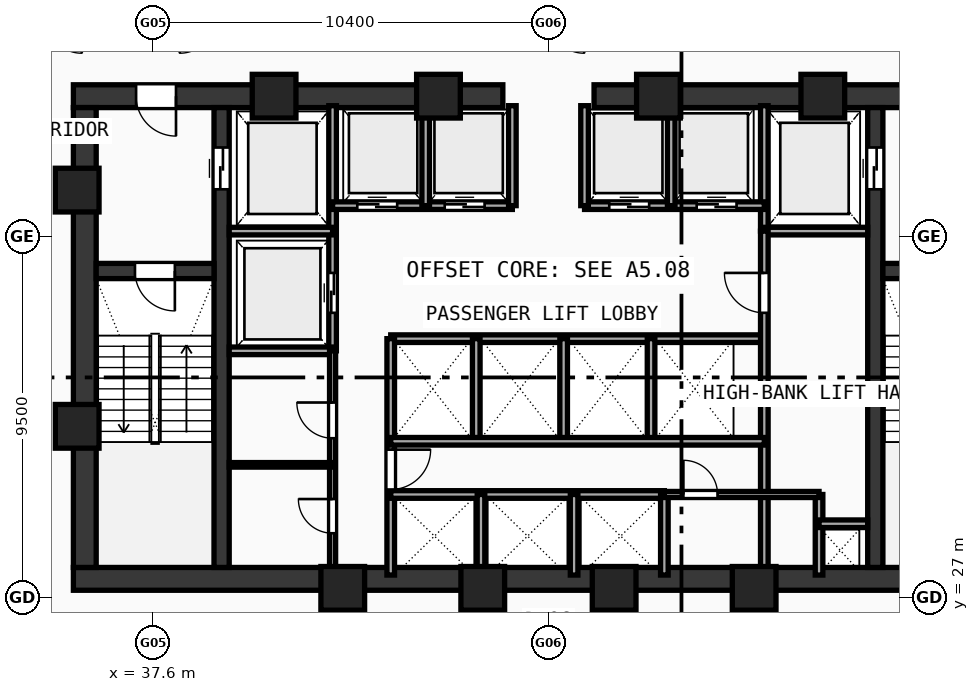
"""IFC4 building model, lengths in metres.
Left out: names, types, materials, properties, quantities, classifications, styles, units other than length and angle.
Written with IfcOpenShell. Run it as: python <this file> out.ifc"""

import sys

from ifc_helpers import new_model, si_unit, direction, frame, frame_2d, origin, origin_with_axes, origin_2d, place, context, subcontext, project, spatial, rectangle, hollow_rectangle, extrude, source, transform, mapped, element, fill, save


model = new_model("IFC4")
c1 = context("Model", 3, precision=1e-05, world=origin(), true_north=direction((0.0, 1.0)))
c2 = subcontext(c1, "Body", "Model", "MODEL_VIEW")
j1 = project(units=[si_unit("LENGTHUNIT", "METRE"), si_unit("PLANEANGLEUNIT", "RADIAN")], contexts=[c1])
p1 = place(None, origin())
s1 = spatial("IfcSite", under=j1, at=p1, CompositionType="ELEMENT")
p2 = place(p1, origin())
s2 = spatial("IfcBuilding", under=s1, at=p2, CompositionType="ELEMENT")
p3 = place(p2, frame((0.0, 0.0, 100.18)))
s3 = spatial("IfcBuildingStorey", under=s2, at=p3, CompositionType="ELEMENT", Elevation=100.18)
p4 = place(p3, frame((35.5, 27.5, 0.0), z_axis=(0.0, 0.0, 1.0), x_axis=(1.0, 0.0, 0.0)))
e1 = element("IfcWall", 1, at=p4, inside=s3, PredefinedType="SHEAR", context=c2, shape_type="SweptSolid", body=[
    extrude(rectangle(XDim=25.0, YDim=0.6, at=frame_2d((12.5, 0.0))), origin(), (0.0, 0.0, 1.0), 3.54),
])
p5 = place(p3, frame((35.5, 40.2, 0.0), z_axis=(0.0, 0.0, 1.0), x_axis=(1.0, 0.0, 0.0)))
e2 = element("IfcWall", 2, at=p5, inside=s3, PredefinedType="SHEAR", context=c2, shape_type="SweptSolid", body=[
    extrude(rectangle(XDim=11.3, YDim=0.6, at=frame_2d((5.65, 0.0))), origin(), (0.0, 0.0, 1.0), 3.54),
])
p6 = place(p5, frame((1.65, 0.0, 0.0)))
e3 = element("IfcOpeningElement", 3, at=p6, cuts=e2, PredefinedType="OPENING", context=c2, shape_type="SweptSolid", body=[
    extrude(rectangle(XDim=1.05, YDim=2.1, at=frame_2d((0.525, 1.05))), frame((0.0, 0.31, 0.0), z_axis=(0.0, -1.0, 0.0), x_axis=(1.0, 0.0, 0.0)), (0.0, 0.0, 1.0), 0.62),
])
p7 = place(p3, frame((49.2, 40.2, 0.0), z_axis=(0.0, 0.0, 1.0), x_axis=(1.0, 0.0, 0.0)))
e4 = element("IfcWall", 4, at=p7, inside=s3, PredefinedType="SHEAR", context=c2, shape_type="SweptSolid", body=[
    extrude(rectangle(XDim=11.3, YDim=0.6, at=frame_2d((5.65, 0.0))), origin(), (0.0, 0.0, 1.0), 3.54),
])
p8 = place(p7, frame((8.6, 0.0, 0.0)))
e5 = element("IfcOpeningElement", 5, at=p8, cuts=e4, PredefinedType="OPENING", context=c2, shape_type="SweptSolid", body=[
    extrude(rectangle(XDim=1.05, YDim=2.1, at=frame_2d((0.525, 1.05))), frame((0.0, 0.31, 0.0), z_axis=(0.0, -1.0, 0.0), x_axis=(1.0, 0.0, 0.0)), (0.0, 0.0, 1.0), 0.62),
])
p9 = place(p3, frame((35.8, 27.8, 0.0), z_axis=(0.0, 0.0, 1.0), x_axis=(0.0, 1.0, 0.0)))
e6 = element("IfcWall", 6, at=p9, inside=s3, PredefinedType="SHEAR", context=c2, shape_type="SweptSolid", body=[
    extrude(rectangle(XDim=12.1, YDim=0.6, at=frame_2d((6.05, 0.0))), origin(), (0.0, 0.0, 1.0), 3.54),
])
p10 = place(p3, frame((39.4, 27.8, 0.0), z_axis=(0.0, 0.0, 1.0), x_axis=(0.0, 1.0, 0.0)))
e7 = element("IfcWall", 7, at=p10, inside=s3, PredefinedType="SHEAR", context=c2, shape_type="SweptSolid", body=[
    extrude(rectangle(XDim=12.1, YDim=0.4, at=frame_2d((6.05, 0.0))), origin(), (0.0, 0.0, 1.0), 3.54),
])
p11 = place(p10, frame((9.95, 0.0, 0.0)))
e8 = element("IfcOpeningElement", 8, at=p11, cuts=e7, PredefinedType="OPENING", context=c2, shape_type="SweptSolid", body=[
    extrude(rectangle(XDim=1.1, YDim=2.1, at=frame_2d((0.55, 1.05))), frame((0.0, 0.21, 0.0), z_axis=(0.0, -1.0, 0.0), x_axis=(1.0, 0.0, 0.0)), (0.0, 0.0, 1.0), 0.42),
])
p12 = place(p3, frame((56.6, 27.8, 0.0), z_axis=(0.0, 0.0, 1.0), x_axis=(0.0, 1.0, 0.0)))
e9 = element("IfcWall", 9, at=p12, inside=s3, PredefinedType="SHEAR", context=c2, shape_type="SweptSolid", body=[
    extrude(rectangle(XDim=12.1, YDim=0.4, at=frame_2d((6.05, 0.0))), origin(), (0.0, 0.0, 1.0), 3.54),
])
p13 = place(p12, frame((9.95, 0.0, 0.0)))
e10 = element("IfcOpeningElement", 10, at=p13, cuts=e9, PredefinedType="OPENING", context=c2, shape_type="SweptSolid", body=[
    extrude(rectangle(XDim=1.1, YDim=2.1, at=frame_2d((0.55, 1.05))), frame((0.0, 0.21, 0.0), z_axis=(0.0, -1.0, 0.0), x_axis=(1.0, 0.0, 0.0)), (0.0, 0.0, 1.0), 0.42),
])
p14 = place(p3, frame((36.1, 35.6, 0.0), z_axis=(0.0, 0.0, 1.0), x_axis=(1.0, 0.0, 0.0)))
e11 = element("IfcWall", 11, at=p14, inside=s3, PredefinedType="SHEAR", context=c2, shape_type="SweptSolid", body=[
    extrude(rectangle(XDim=3.1, YDim=0.4, at=frame_2d((1.55, 0.0))), origin(), (0.0, 0.0, 1.0), 3.54),
])
p15 = place(p14, frame((1.02, 0.0, 0.0)))
e12 = element("IfcOpeningElement", 12, at=p15, cuts=e11, PredefinedType="OPENING", context=c2, shape_type="SweptSolid", body=[
    extrude(rectangle(XDim=1.05, YDim=2.1, at=frame_2d((0.525, 1.05))), frame((0.0, 0.21, 0.0), z_axis=(0.0, -1.0, 0.0), x_axis=(1.0, 0.0, 0.0)), (0.0, 0.0, 1.0), 0.42),
])
p16 = place(p3, frame((56.8, 35.6, 0.0), z_axis=(0.0, 0.0, 1.0), x_axis=(1.0, 0.0, 0.0)))
e13 = element("IfcWall", 13, at=p16, inside=s3, PredefinedType="SHEAR", context=c2, shape_type="SweptSolid", body=[
    extrude(rectangle(XDim=3.1, YDim=0.4, at=frame_2d((1.55, 0.0))), origin(), (0.0, 0.0, 1.0), 3.54),
])
p17 = place(p16, frame((1.02, 0.0, 0.0)))
e14 = element("IfcOpeningElement", 14, at=p17, cuts=e13, PredefinedType="OPENING", context=c2, shape_type="SweptSolid", body=[
    extrude(rectangle(XDim=1.05, YDim=2.1, at=frame_2d((0.525, 1.05))), frame((0.0, 0.21, 0.0), z_axis=(0.0, -1.0, 0.0), x_axis=(1.0, 0.0, 0.0)), (0.0, 0.0, 1.0), 0.42),
])
m1 = source(origin(), c2, "Body", "SweptSolid", [
    extrude(hollow_rectangle(XDim=1.15, YDim=1.15, WallThickness=0.048, at=origin_2d()), origin(), (0.0, 0.0, 1.0), 3.8),
])
for number, where, z_axis, x_axis in (
    (15, (42.588, 27.25, -0.26), (0.0, 0.0, 1.0), (1.0, 0.0, 0.0)),
    (16, (46.272, 27.25, -0.26), (0.0, 0.0, 1.0), (1.0, 0.0, 0.0)),
    (17, (49.729, 27.25, -0.26), (0.0, 0.0, 1.0), (1.0, 0.0, 0.0)),
    (18, (53.412, 27.25, -0.26), (0.0, 0.0, 1.0), (1.0, 0.0, 0.0)),
    (19, (55.219, 40.2, -0.26), (0.0, 0.0, 1.0), (1.0, 0.0, 0.0)),
    (20, (50.894, 40.2, -0.26), (0.0, 0.0, 1.0), (1.0, 0.0, 0.0)),
    (21, (45.106, 40.2, -0.26), (0.0, 0.0, 1.0), (1.0, 0.0, 0.0)),
    (22, (40.781, 40.2, -0.26), (0.0, 0.0, 1.0), (1.0, 0.0, 0.0)),
    (23, (35.6, 37.729, -0.26), (0.0, 0.0, 1.0), (1.0, 0.0, 0.0)),
    (24, (35.6, 31.513, -0.26), (0.0, 0.0, 1.0), (1.0, 0.0, 0.0)),
):
    element("IfcColumn", number, at=place(p3, frame(where, z_axis=z_axis, x_axis=x_axis)), inside=s3, PredefinedType="COLUMN", context=c2, shape_type="MappedRepresentation", body=[
        mapped(m1, transform((0.0, 0.0, 0.0), scale=1.0)),
    ])
p18 = place(p3, frame((42.32, 33.5, 0.0), z_axis=(0.0, 0.0, 1.0), x_axis=(0.0, 1.0, 0.0)))
e25 = element("IfcWall", 25, at=p18, inside=s3, PredefinedType="SOLIDWALL", context=c2, shape_type="SweptSolid", body=[
    extrude(rectangle(XDim=6.45, YDim=0.2, at=frame_2d((3.225, 0.0))), origin(), (0.0, 0.0, 1.0), 3.54),
])
p19 = place(p18, frame((1.0, 0.0, 0.0)))
e26 = element("IfcOpeningElement", 26, at=p19, cuts=e25, PredefinedType="OPENING", context=c2, shape_type="SweptSolid", body=[
    extrude(rectangle(XDim=1.05, YDim=2.1, at=frame_2d((0.525, 1.05))), frame((0.0, 0.11, 0.0), z_axis=(0.0, -1.0, 0.0), x_axis=(1.0, 0.0, 0.0)), (0.0, 0.0, 1.0), 0.22),
])
for number, where, z_axis, x_axis in (
    (27, (39.6, 36.65, 0.0), (0.0, 0.0, 1.0), (1.0, 0.0, 0.0)),
    (28, (39.6, 33.5, 0.0), (0.0, 0.0, 1.0), (1.0, 0.0, 0.0)),
):
    element("IfcWall", number, at=place(p3, frame(where, z_axis=z_axis, x_axis=x_axis)), inside=s3, PredefinedType="SOLIDWALL", context=c2, shape_type="SweptSolid", body=[
        extrude(rectangle(XDim=2.72, YDim=0.2, at=frame_2d((1.36, 0.0))), origin(), (0.0, 0.0, 1.0), 3.54),
    ])
p20 = place(p3, frame((53.68, 36.65, 0.0), z_axis=(0.0, 0.0, 1.0), x_axis=(0.0, 1.0, 0.0)))
e29 = element("IfcWall", 29, at=p20, inside=s3, PredefinedType="SOLIDWALL", context=c2, shape_type="SweptSolid", body=[
    extrude(rectangle(XDim=3.3, YDim=0.2, at=frame_2d((1.65, 0.0))), origin(), (0.0, 0.0, 1.0), 3.54),
])
p21 = place(p3, frame((53.68, 36.65, 0.0), z_axis=(0.0, 0.0, 1.0), x_axis=(1.0, 0.0, 0.0)))
e30 = element("IfcWall", 30, at=p21, inside=s3, PredefinedType="SOLIDWALL", context=c2, shape_type="SweptSolid", body=[
    extrude(rectangle(XDim=2.72, YDim=0.2, at=frame_2d((1.36, 0.0))), origin(), (0.0, 0.0, 1.0), 3.54),
])
p22 = place(p3, frame((42.32, 37.32, 0.0), z_axis=(0.0, 0.0, 1.0), x_axis=(1.0, 0.0, 0.0)))
e31 = element("IfcWall", 31, at=p22, inside=s3, PredefinedType="SOLIDWALL", context=c2, shape_type="SweptSolid", body=[
    extrude(rectangle(XDim=4.73, YDim=0.2, at=frame_2d((2.365, 0.0))), origin(), (0.0, 0.0, 1.0), 3.54),
])
p23 = place(p22, frame((0.65, 0.0, 0.0)))
e32 = element("IfcOpeningElement", 32, at=p23, cuts=e31, PredefinedType="OPENING", context=c2, shape_type="SweptSolid", body=[
    extrude(rectangle(XDim=1.05, YDim=2.1, at=frame_2d((0.525, 1.05))), frame((0.0, 0.11, 0.0), z_axis=(0.0, -1.0, 0.0), x_axis=(1.0, 0.0, 0.0)), (0.0, 0.0, 1.0), 0.22),
])
p24 = place(p22, frame((2.95, 0.0, 0.0)))
e33 = element("IfcOpeningElement", 33, at=p24, cuts=e31, PredefinedType="OPENING", context=c2, shape_type="SweptSolid", body=[
    extrude(rectangle(XDim=1.05, YDim=2.1, at=frame_2d((0.525, 1.05))), frame((0.0, 0.11, 0.0), z_axis=(0.0, -1.0, 0.0), x_axis=(1.0, 0.0, 0.0)), (0.0, 0.0, 1.0), 0.22),
])
p25 = place(p3, frame((48.95, 37.32, 0.0), z_axis=(0.0, 0.0, 1.0), x_axis=(1.0, 0.0, 0.0)))
e34 = element("IfcWall", 34, at=p25, inside=s3, PredefinedType="SOLIDWALL", context=c2, shape_type="SweptSolid", body=[
    extrude(rectangle(XDim=4.73, YDim=0.2, at=frame_2d((2.365, 0.0))), origin(), (0.0, 0.0, 1.0), 3.54),
])
p26 = place(p25, frame((0.65, 0.0, 0.0)))
e35 = element("IfcOpeningElement", 35, at=p26, cuts=e34, PredefinedType="OPENING", context=c2, shape_type="SweptSolid", body=[
    extrude(rectangle(XDim=1.05, YDim=2.1, at=frame_2d((0.525, 1.05))), frame((0.0, 0.11, 0.0), z_axis=(0.0, -1.0, 0.0), x_axis=(1.0, 0.0, 0.0)), (0.0, 0.0, 1.0), 0.22),
])
p27 = place(p25, frame((2.95, 0.0, 0.0)))
e36 = element("IfcOpeningElement", 36, at=p27, cuts=e34, PredefinedType="OPENING", context=c2, shape_type="SweptSolid", body=[
    extrude(rectangle(XDim=1.05, YDim=2.1, at=frame_2d((0.525, 1.05))), frame((0.0, 0.11, 0.0), z_axis=(0.0, -1.0, 0.0), x_axis=(1.0, 0.0, 0.0)), (0.0, 0.0, 1.0), 0.22),
])
for number, where, z_axis, x_axis in (
    (37, (47.05, 37.32, 0.0), (0.0, 0.0, 1.0), (0.0, 1.0, 0.0)),
    (38, (48.95, 37.32, 0.0), (0.0, 0.0, 1.0), (0.0, 1.0, 0.0)),
    (39, (44.77, 37.32, 0.0), (0.0, 0.0, 1.0), (0.0, 1.0, 0.0)),
    (40, (51.23, 37.32, 0.0), (0.0, 0.0, 1.0), (0.0, 1.0, 0.0)),
):
    element("IfcWall", number, at=place(p3, frame(where, z_axis=z_axis, x_axis=x_axis)), inside=s3, PredefinedType="SOLIDWALL", context=c2, shape_type="SweptSolid", body=[
        extrude(rectangle(XDim=2.63, YDim=0.2, at=frame_2d((1.315, 0.0))), origin(), (0.0, 0.0, 1.0), 3.54),
    ])
p28 = place(p3, frame((43.85, 33.82, 0.0), z_axis=(0.0, 0.0, 1.0), x_axis=(1.0, 0.0, 0.0)))
e41 = element("IfcWall", 41, at=p28, inside=s3, PredefinedType="SOLIDWALL", context=c2, shape_type="SweptSolid", body=[
    extrude(rectangle(XDim=9.83, YDim=0.2, at=frame_2d((4.915, 0.0))), origin(), (0.0, 0.0, 1.0), 3.54),
])
p29 = place(p3, frame((43.85, 27.6, 0.0), z_axis=(0.0, 0.0, 1.0), x_axis=(0.0, 1.0, 0.0)))
e42 = element("IfcWall", 42, at=p29, inside=s3, PredefinedType="SOLIDWALL", context=c2, shape_type="SweptSolid", body=[
    extrude(rectangle(XDim=6.22, YDim=0.2, at=frame_2d((3.11, 0.0))), origin(), (0.0, 0.0, 1.0), 3.54),
])
p30 = place(p29, frame((2.25, 0.0, 0.0)))
e43 = element("IfcOpeningElement", 43, at=p30, cuts=e42, PredefinedType="OPENING", context=c2, shape_type="SweptSolid", body=[
    extrude(rectangle(XDim=1.05, YDim=2.1, at=frame_2d((0.525, 1.05))), frame((0.0, 0.11, 0.0), z_axis=(0.0, -1.0, 0.0), x_axis=(1.0, 0.0, 0.0)), (0.0, 0.0, 1.0), 0.22),
])
p31 = place(p3, frame((53.68, 27.6, 0.0), z_axis=(0.0, 0.0, 1.0), x_axis=(0.0, 1.0, 0.0)))
e44 = element("IfcWall", 44, at=p31, inside=s3, PredefinedType="SOLIDWALL", context=c2, shape_type="SweptSolid", body=[
    extrude(rectangle(XDim=9.05, YDim=0.2, at=frame_2d((4.525, 0.0))), origin(), (0.0, 0.0, 1.0), 3.54),
])
p32 = place(p31, frame((6.9, 0.0, 0.0)))
e45 = element("IfcOpeningElement", 45, at=p32, cuts=e44, PredefinedType="OPENING", context=c2, shape_type="SweptSolid", body=[
    extrude(rectangle(XDim=1.05, YDim=2.1, at=frame_2d((0.525, 1.05))), frame((0.0, 0.11, 0.0), z_axis=(0.0, -1.0, 0.0), x_axis=(1.0, 0.0, 0.0)), (0.0, 0.0, 1.0), 0.22),
])
for number, where, z_axis, x_axis in (
    (46, (46.1, 31.12, 0.0), (0.0, 0.0, 1.0), (0.0, 1.0, 0.0)),
    (47, (48.4, 31.12, 0.0), (0.0, 0.0, 1.0), (0.0, 1.0, 0.0)),
    (48, (50.7, 31.12, 0.0), (0.0, 0.0, 1.0), (0.0, 1.0, 0.0)),
):
    element("IfcWall", number, at=place(p3, frame(where, z_axis=z_axis, x_axis=x_axis)), inside=s3, PredefinedType="SOLIDWALL", context=c2, shape_type="SweptSolid", body=[
        extrude(rectangle(XDim=2.7, YDim=0.2, at=frame_2d((1.35, 0.0))), origin(), (0.0, 0.0, 1.0), 3.54),
    ])
p33 = place(p3, frame((43.85, 29.72, 0.0), z_axis=(0.0, 0.0, 1.0), x_axis=(1.0, 0.0, 0.0)))
e49 = element("IfcWall", 49, at=p33, inside=s3, PredefinedType="SOLIDWALL", context=c2, shape_type="SweptSolid", body=[
    extrude(rectangle(XDim=7.2, YDim=0.2, at=frame_2d((3.6, 0.0))), origin(), (0.0, 0.0, 1.0), 3.54),
])
p34 = place(p3, frame((51.05, 27.6, 0.0), z_axis=(0.0, 0.0, 1.0), x_axis=(0.0, 1.0, 0.0)))
e50 = element("IfcWall", 50, at=p34, inside=s3, PredefinedType="SOLIDWALL", context=c2, shape_type="SweptSolid", body=[
    extrude(rectangle(XDim=2.12, YDim=0.2, at=frame_2d((1.06, 0.0))), origin(), (0.0, 0.0, 1.0), 3.54),
])
p35 = place(p3, frame((43.85, 31.12, 0.0), z_axis=(0.0, 0.0, 1.0), x_axis=(1.0, 0.0, 0.0)))
e51 = element("IfcWall", 51, at=p35, inside=s3, PredefinedType="SOLIDWALL", context=c2, shape_type="SweptSolid", body=[
    extrude(rectangle(XDim=9.83, YDim=0.2, at=frame_2d((4.915, 0.0))), origin(), (0.0, 0.0, 1.0), 3.54),
])
for number, where, z_axis, x_axis in (
    (52, (46.225, 27.6, 0.0), (0.0, 0.0, 1.0), (0.0, 1.0, 0.0)),
    (53, (48.675, 27.6, 0.0), (0.0, 0.0, 1.0), (0.0, 1.0, 0.0)),
    (54, (55.12, 27.6, 0.0), (0.0, 0.0, 1.0), (0.0, 1.0, 0.0)),
):
    element("IfcWall", number, at=place(p3, frame(where, z_axis=z_axis, x_axis=x_axis)), inside=s3, PredefinedType="SOLIDWALL", context=c2, shape_type="SweptSolid", body=[
        extrude(rectangle(XDim=2.12, YDim=0.2, at=frame_2d((1.06, 0.0))), origin(), (0.0, 0.0, 1.0), 3.54),
    ])
p36 = place(p3, frame((55.12, 28.95, 0.0), z_axis=(0.0, 0.0, 1.0), x_axis=(1.0, 0.0, 0.0)))
e55 = element("IfcWall", 55, at=p36, inside=s3, PredefinedType="SOLIDWALL", context=c2, shape_type="SweptSolid", body=[
    extrude(rectangle(XDim=1.28, YDim=0.2, at=frame_2d((0.64, 0.0))), origin(), (0.0, 0.0, 1.0), 3.54),
])
p37 = place(p3, frame((42.32, 27.6, 0.0), z_axis=(0.0, 0.0, 1.0), x_axis=(0.0, 1.0, 0.0)))
e56 = element("IfcWall", 56, at=p37, inside=s3, PredefinedType="PARTITIONING", context=c2, shape_type="SweptSolid", body=[
    extrude(rectangle(XDim=5.9, YDim=0.16, at=frame_2d((2.95, 0.0))), origin(), (0.0, 0.0, 1.0), 3.54),
])
p38 = place(p37, frame((1.1, 0.0, 0.0)))
e57 = element("IfcOpeningElement", 57, at=p38, cuts=e56, PredefinedType="OPENING", context=c2, shape_type="SweptSolid", body=[
    extrude(rectangle(XDim=0.9, YDim=2.1, at=frame_2d((0.45, 1.05))), frame((0.0, 0.09, 0.0), z_axis=(0.0, -1.0, 0.0), x_axis=(1.0, 0.0, 0.0)), (0.0, 0.0, 1.0), 0.18),
])
p39 = place(p37, frame((3.6, 0.0, 0.0)))
e58 = element("IfcOpeningElement", 58, at=p39, cuts=e56, PredefinedType="OPENING", context=c2, shape_type="SweptSolid", body=[
    extrude(rectangle(XDim=0.94, YDim=2.1, at=frame_2d((0.47, 1.05))), frame((0.0, 0.09, 0.0), z_axis=(0.0, -1.0, 0.0), x_axis=(1.0, 0.0, 0.0)), (0.0, 0.0, 1.0), 0.18),
])
p40 = place(p3, frame((51.05, 29.72, 0.0), z_axis=(0.0, 0.0, 1.0), x_axis=(1.0, 0.0, 0.0)))
e59 = element("IfcWall", 59, at=p40, inside=s3, PredefinedType="PARTITIONING", context=c2, shape_type="SweptSolid", body=[
    extrude(rectangle(XDim=4.07, YDim=0.16, at=frame_2d((2.035, 0.0))), origin(), (0.0, 0.0, 1.0), 3.54),
])
p41 = place(p40, frame((0.5, 0.0, 0.0)))
e60 = element("IfcOpeningElement", 60, at=p41, cuts=e59, PredefinedType="OPENING", context=c2, shape_type="SweptSolid", body=[
    extrude(rectangle(XDim=0.9, YDim=2.1, at=frame_2d((0.45, 1.05))), frame((0.0, 0.09, 0.0), z_axis=(0.0, -1.0, 0.0), x_axis=(1.0, 0.0, 0.0)), (0.0, 0.0, 1.0), 0.18),
])
p42 = place(p3, frame((39.6, 30.5, 0.0), z_axis=(0.0, 0.0, 1.0), x_axis=(1.0, 0.0, 0.0)))
e61 = element("IfcWall", 61, at=p42, inside=s3, PredefinedType="PARTITIONING", context=c2, shape_type="SweptSolid", body=[
    extrude(rectangle(XDim=2.72, YDim=0.12, at=frame_2d((1.36, 0.0))), origin(), (0.0, 0.0, 1.0), 3.54),
])
m2 = source(origin(), c2, "Body", "SweptSolid", [
    extrude(rectangle(XDim=1.05, YDim=2.1, at=frame_2d((0.525, 1.05))), frame((0.0, 0.025, 0.0), z_axis=(0.0, -1.0, 0.0), x_axis=(1.0, 0.0, 0.0)), (0.0, 0.0, 1.0), 0.05),
])
p43 = place(p15, frame((1.05, 0.0, 0.0), z_axis=(0.0, 0.0, 1.0), x_axis=(-1.0, 0.0, 0.0)))
e62 = element("IfcDoor", 62, at=p43, inside=s3, OperationType="SINGLE_SWING_LEFT", PredefinedType="DOOR", context=c2, shape_type="MappedRepresentation", body=[
    mapped(m2, transform((0.0, 0.0, 0.0), scale=1.0)),
])
fill(e12, e62)
p44 = place(p6, frame((1.05, 0.0, 0.0), z_axis=(0.0, 0.0, 1.0), x_axis=(-1.0, 0.0, 0.0)))
e63 = element("IfcDoor", 63, at=p44, inside=s3, OperationType="SINGLE_SWING_LEFT", PredefinedType="DOOR", context=c2, shape_type="MappedRepresentation", body=[
    mapped(m2, transform((0.0, 0.0, 0.0), scale=1.0)),
])
fill(e3, e63)
m3 = source(origin(), c2, "Body", "SweptSolid", [
    extrude(rectangle(XDim=1.1, YDim=2.1, at=frame_2d((0.55, 1.05))), frame((0.0, 0.025, 0.0), z_axis=(0.0, -1.0, 0.0), x_axis=(1.0, 0.0, 0.0)), (0.0, 0.0, 1.0), 0.05),
])
p45 = place(p11, frame((1.1, 0.0, 0.0), z_axis=(0.0, 0.0, 1.0), x_axis=(-1.0, 0.0, 0.0)))
e64 = element("IfcDoor", 64, at=p45, inside=s3, OperationType="DOUBLE_DOOR_SLIDING", PredefinedType="DOOR", context=c2, shape_type="MappedRepresentation", body=[
    mapped(m3, transform((0.0, 0.0, 0.0), scale=1.0)),
])
fill(e8, e64)
p46 = place(p13, origin_with_axes())
e65 = element("IfcDoor", 65, at=p46, inside=s3, OperationType="DOUBLE_DOOR_SLIDING", PredefinedType="DOOR", context=c2, shape_type="MappedRepresentation", body=[
    mapped(m3, transform((0.0, 0.0, 0.0), scale=1.0)),
])
fill(e10, e65)
p47 = place(p19, origin_with_axes())
e66 = element("IfcDoor", 66, at=p47, inside=s3, OperationType="DOUBLE_DOOR_SLIDING", PredefinedType="DOOR", context=c2, shape_type="MappedRepresentation", body=[
    mapped(m2, transform((0.0, 0.0, 0.0), scale=1.0)),
])
fill(e26, e66)
p48 = place(p23, frame((1.05, 0.0, 0.0), z_axis=(0.0, 0.0, 1.0), x_axis=(-1.0, 0.0, 0.0)))
e67 = element("IfcDoor", 67, at=p48, inside=s3, OperationType="DOUBLE_DOOR_SLIDING", PredefinedType="DOOR", context=c2, shape_type="MappedRepresentation", body=[
    mapped(m2, transform((0.0, 0.0, 0.0), scale=1.0)),
])
fill(e32, e67)
p49 = place(p24, frame((1.05, 0.0, 0.0), z_axis=(0.0, 0.0, 1.0), x_axis=(-1.0, 0.0, 0.0)))
e68 = element("IfcDoor", 68, at=p49, inside=s3, OperationType="DOUBLE_DOOR_SLIDING", PredefinedType="DOOR", context=c2, shape_type="MappedRepresentation", body=[
    mapped(m2, transform((0.0, 0.0, 0.0), scale=1.0)),
])
fill(e33, e68)
p50 = place(p26, frame((1.05, 0.0, 0.0), z_axis=(0.0, 0.0, 1.0), x_axis=(-1.0, 0.0, 0.0)))
e69 = element("IfcDoor", 69, at=p50, inside=s3, OperationType="DOUBLE_DOOR_SLIDING", PredefinedType="DOOR", context=c2, shape_type="MappedRepresentation", body=[
    mapped(m2, transform((0.0, 0.0, 0.0), scale=1.0)),
])
fill(e35, e69)
p51 = place(p27, frame((1.05, 0.0, 0.0), z_axis=(0.0, 0.0, 1.0), x_axis=(-1.0, 0.0, 0.0)))
e70 = element("IfcDoor", 70, at=p51, inside=s3, OperationType="DOUBLE_DOOR_SLIDING", PredefinedType="DOOR", context=c2, shape_type="MappedRepresentation", body=[
    mapped(m2, transform((0.0, 0.0, 0.0), scale=1.0)),
])
fill(e36, e70)
p52 = place(p30, frame((1.05, 0.0, 0.0), z_axis=(0.0, 0.0, 1.0), x_axis=(-1.0, 0.0, 0.0)))
e71 = element("IfcDoor", 71, at=p52, inside=s3, OperationType="SINGLE_SWING_LEFT", PredefinedType="DOOR", context=c2, shape_type="MappedRepresentation", body=[
    mapped(m2, transform((0.0, 0.0, 0.0), scale=1.0)),
])
fill(e43, e71)
p53 = place(p32, origin_with_axes())
e72 = element("IfcDoor", 72, at=p53, inside=s3, OperationType="SINGLE_SWING_RIGHT", PredefinedType="DOOR", context=c2, shape_type="MappedRepresentation", body=[
    mapped(m2, transform((0.0, 0.0, 0.0), scale=1.0)),
])
fill(e45, e72)
m4 = source(origin(), c2, "Body", "SweptSolid", [
    extrude(rectangle(XDim=0.9, YDim=2.1, at=frame_2d((0.45, 1.05))), frame((0.0, 0.025, 0.0), z_axis=(0.0, -1.0, 0.0), x_axis=(1.0, 0.0, 0.0)), (0.0, 0.0, 1.0), 0.05),
])
p54 = place(p38, origin_with_axes())
e73 = element("IfcDoor", 73, at=p54, inside=s3, OperationType="SINGLE_SWING_RIGHT", PredefinedType="DOOR", context=c2, shape_type="MappedRepresentation", body=[
    mapped(m4, transform((0.0, 0.0, 0.0), scale=1.0)),
])
fill(e57, e73)
m5 = source(origin(), c2, "Body", "SweptSolid", [
    extrude(rectangle(XDim=0.94, YDim=2.1, at=frame_2d((0.47, 1.05))), frame((0.0, 0.025, 0.0), z_axis=(0.0, -1.0, 0.0), x_axis=(1.0, 0.0, 0.0)), (0.0, 0.0, 1.0), 0.05),
])
p55 = place(p39, origin_with_axes())
e74 = element("IfcDoor", 74, at=p55, inside=s3, OperationType="SINGLE_SWING_RIGHT", PredefinedType="DOOR", context=c2, shape_type="MappedRepresentation", body=[
    mapped(m5, transform((0.0, 0.0, 0.0), scale=1.0)),
])
fill(e58, e74)
p56 = place(p41, origin_with_axes())
e75 = element("IfcDoor", 75, at=p56, inside=s3, OperationType="SINGLE_SWING_LEFT", PredefinedType="DOOR", context=c2, shape_type="MappedRepresentation", body=[
    mapped(m4, transform((0.0, 0.0, 0.0), scale=1.0)),
])
fill(e60, e75)
save(model, sys.argv[1])
